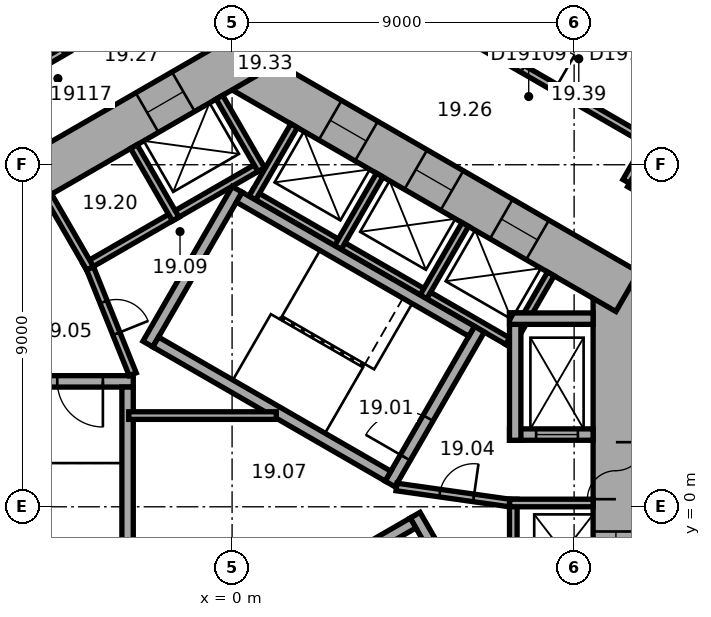
"""IFC4 building model, lengths in metres.
Left out: names, types, materials, properties, quantities, classifications, styles, units other than length and angle.
Written with IfcOpenShell. Run it as: python <this file> out.ifc"""

import sys

from ifc_helpers import new_model, si_unit, direction, frame, frame_2d, origin, place, context, subcontext, project, spatial, rectangle, extrude, element, fill, save


model = new_model("IFC4")
c1 = context("Model", 3, precision=1e-05, world=origin(), true_north=direction((0.0, 1.0)))
c2 = subcontext(c1, "Body", "Model", "MODEL_VIEW")
j1 = project(units=[si_unit("LENGTHUNIT", "METRE"), si_unit("PLANEANGLEUNIT", "RADIAN")], contexts=[c1])
p1 = place(None, origin())
s1 = spatial("IfcSite", under=j1, at=p1, CompositionType="ELEMENT")
p2 = place(p1, origin())
s2 = spatial("IfcBuilding", under=s1, at=p2, CompositionType="ELEMENT")
p3 = place(p2, frame((0.0, 0.0, 86.9)))
s3 = spatial("IfcBuildingStorey", under=s2, at=p3, CompositionType="ELEMENT", Elevation=86.9)
p4 = place(p3, frame((10.1, -6.177, 0.0), z_axis=(0.0, 0.0, 1.0), x_axis=(0.0, 1.0, 0.0)))
e1 = element("IfcWall", 1, at=p4, inside=s3, PredefinedType="SHEAR", context=c2, shape_type="SweptSolid", body=[
    extrude(rectangle(XDim=12.355, YDim=1.2, at=frame_2d((6.177, 0.0))), origin(), (0.0, 0.0, 1.0), 3.3),
])
p5 = place(p4, frame((6.378, 0.0, 0.0)))
e2 = element("IfcOpeningElement", 2, at=p5, cuts=e1, PredefinedType="OPENING", context=c2, shape_type="SweptSolid", body=[
    extrude(rectangle(XDim=1.5, YDim=2.1, at=frame_2d((0.75, 1.05))), frame((0.0, 0.61, 0.0), z_axis=(0.0, -1.0, 0.0), x_axis=(1.0, 0.0, 0.0)), (0.0, 0.0, 1.0), 1.22),
])
p6 = place(p4, frame((1.828, 0.0, 0.0)))
e3 = element("IfcOpeningElement", 3, at=p6, cuts=e1, PredefinedType="OPENING", context=c2, shape_type="SweptSolid", body=[
    extrude(rectangle(XDim=1.1, YDim=2.1, at=frame_2d((0.55, 1.05))), frame((0.0, 0.61, 0.0), z_axis=(0.0, -1.0, 0.0), x_axis=(1.0, 0.0, 0.0)), (0.0, 0.0, 1.0), 1.22),
])
p7 = place(p4, frame((4.427, 0.0, 0.0)))
e4 = element("IfcOpeningElement", 4, at=p7, cuts=e1, PredefinedType="OPENING", context=c2, shape_type="SweptSolid", body=[
    extrude(rectangle(XDim=1.1, YDim=2.1, at=frame_2d((0.55, 1.05))), frame((0.0, 0.61, 0.0), z_axis=(0.0, -1.0, 0.0), x_axis=(1.0, 0.0, 0.0)), (0.0, 0.0, 1.0), 1.22),
])
p8 = place(p3, frame((10.4, 5.658, 0.0), z_axis=(0.0, 0.0, 1.0), x_axis=(-0.866021384402, 0.500006961711, 0.0)))
e5 = element("IfcWall", 5, at=p8, inside=s3, PredefinedType="SHEAR", context=c2, shape_type="SweptSolid", body=[
    extrude(rectangle(XDim=12.355, YDim=1.2, at=frame_2d((6.178, 0.0))), origin(), (0.0, 0.0, 1.0), 3.3),
])
p9 = place(p8, frame((2.728, 0.0, 0.0)))
e6 = element("IfcOpeningElement", 6, at=p9, cuts=e5, PredefinedType="OPENING", context=c2, shape_type="SweptSolid", body=[
    extrude(rectangle(XDim=1.1, YDim=2.1, at=frame_2d((0.55, 1.05))), frame((0.0, 0.61, 0.0), z_axis=(0.0, -1.0, 0.0), x_axis=(1.0, 0.0, 0.0)), (0.0, 0.0, 1.0), 1.22),
])
p10 = place(p8, frame((5.328, 0.0, 0.0)))
e7 = element("IfcOpeningElement", 7, at=p10, cuts=e5, PredefinedType="OPENING", context=c2, shape_type="SweptSolid", body=[
    extrude(rectangle(XDim=1.1, YDim=2.1, at=frame_2d((0.55, 1.05))), frame((0.0, 0.61, 0.0), z_axis=(0.0, -1.0, 0.0), x_axis=(1.0, 0.0, 0.0)), (0.0, 0.0, 1.0), 1.22),
])
p11 = place(p8, frame((7.928, 0.0, 0.0)))
e8 = element("IfcOpeningElement", 8, at=p11, cuts=e5, PredefinedType="OPENING", context=c2, shape_type="SweptSolid", body=[
    extrude(rectangle(XDim=1.1, YDim=2.1, at=frame_2d((0.55, 1.05))), frame((0.0, 0.61, 0.0), z_axis=(0.0, -1.0, 0.0), x_axis=(1.0, 0.0, 0.0)), (0.0, 0.0, 1.0), 1.22),
])
p12 = place(p3, frame((0.3, 11.836, 0.0), z_axis=(0.0, 0.0, 1.0), x_axis=(-0.866021384402, -0.500006961711, 0.0)))
e9 = element("IfcWall", 9, at=p12, inside=s3, PredefinedType="SHEAR", context=c2, shape_type="SweptSolid", body=[
    extrude(rectangle(XDim=12.355, YDim=1.2, at=frame_2d((6.178, 0.0))), origin(), (0.0, 0.0, 1.0), 3.3),
])
p13 = place(p12, frame((6.378, 0.0, 0.0)))
e10 = element("IfcOpeningElement", 10, at=p13, cuts=e9, PredefinedType="OPENING", context=c2, shape_type="SweptSolid", body=[
    extrude(rectangle(XDim=1.5, YDim=2.1, at=frame_2d((0.75, 1.05))), frame((0.0, 0.61, 0.0), z_axis=(0.0, -1.0, 0.0), x_axis=(1.0, 0.0, 0.0)), (0.0, 0.0, 1.0), 1.22),
])
p14 = place(p12, frame((1.828, 0.0, 0.0)))
e11 = element("IfcOpeningElement", 11, at=p14, cuts=e9, PredefinedType="OPENING", context=c2, shape_type="SweptSolid", body=[
    extrude(rectangle(XDim=1.1, YDim=2.1, at=frame_2d((0.55, 1.05))), frame((0.0, 0.61, 0.0), z_axis=(0.0, -1.0, 0.0), x_axis=(1.0, 0.0, 0.0)), (0.0, 0.0, 1.0), 1.22),
])
p15 = place(p3, frame((7.4, -5.2, 0.0), z_axis=(0.0, 0.0, 1.0), x_axis=(0.0, 1.0, 0.0)))
e12 = element("IfcWall", 12, at=p15, inside=s3, PredefinedType="PARTITIONING", context=c2, shape_type="SweptSolid", body=[
    extrude(rectangle(XDim=5.4, YDim=0.2, at=frame_2d((2.7, 0.0))), origin(), (0.0, 0.0, 1.0), 3.05),
])
p16 = place(p3, frame((7.3, 0.1, 0.0), z_axis=(0.0, 0.0, 1.0), x_axis=(1.0, 0.0, 0.0)))
e13 = element("IfcWall", 13, at=p16, inside=s3, PredefinedType="PARTITIONING", context=c2, shape_type="SweptSolid", body=[
    extrude(rectangle(XDim=2.2, YDim=0.2, at=frame_2d((1.1, 0.0))), origin(), (0.0, 0.0, 1.0), 3.05),
])
p17 = place(p3, frame((7.424, 4.259, 0.0), z_axis=(0.0, 0.0, 1.0), x_axis=(-0.866026010844, 0.49999894854, 0.0)))
e14 = element("IfcWall", 14, at=p17, inside=s3, PredefinedType="PARTITIONING", context=c2, shape_type="SweptSolid", body=[
    extrude(rectangle(XDim=8.0, YDim=0.2, at=frame_2d((4.0, 0.0))), origin(), (0.0, 0.0, 1.0), 3.05),
])
for number, where, z_axis, x_axis in (
    (15, (7.287, 4.222, 0.0), (0.0, 0.0, 1.0), (0.5, 0.866, 0.0)),
    (16, (5.036, 5.522, 0.0), (0.0, 0.0, 1.0), (0.5, 0.866, 0.0)),
    (17, (2.784, 6.822, 0.0), (0.0, 0.0, 1.0), (0.5, 0.866, 0.0)),
    (18, (0.532, 8.122, 0.0), (0.0, 0.0, 1.0), (0.5, 0.866, 0.0)),
):
    element("IfcWall", number, at=place(p3, frame(where, z_axis=z_axis, x_axis=x_axis)), inside=s3, PredefinedType="PARTITIONING", context=c2, shape_type="SweptSolid", body=[
        extrude(rectangle(XDim=2.2, YDim=0.2, at=frame_2d((1.1, 0.0))), origin(), (0.0, 0.0, 1.0), 3.05),
    ])
p18 = place(p3, frame((0.803, 9.009, 0.0), z_axis=(0.0, 0.0, 1.0), x_axis=(-0.866028230842, -0.499995103361, 0.0)))
e19 = element("IfcWall", 19, at=p18, inside=s3, PredefinedType="PARTITIONING", context=c2, shape_type="SweptSolid", body=[
    extrude(rectangle(XDim=5.4, YDim=0.2, at=frame_2d((2.7, 0.0))), origin(), (0.0, 0.0, 1.0), 3.05),
])
p19 = place(p3, frame((0.767, 8.872, 0.0), z_axis=(0.0, 0.0, 1.0), x_axis=(-0.499994660107, 0.866028486751, 0.0)))
e20 = element("IfcWall", 20, at=p19, inside=s3, PredefinedType="PARTITIONING", context=c2, shape_type="SweptSolid", body=[
    extrude(rectangle(XDim=2.2, YDim=0.2, at=frame_2d((1.1, 0.0))), origin(), (0.0, 0.0, 1.0), 3.05),
])
for number, where, z_axis, x_axis in (
    (21, (-1.485, 7.572, 0.0), (0.0, 0.0, 1.0), (-0.5, 0.866, 0.0)),
    (22, (-3.737, 6.272, 0.0), (0.0, 0.0, 1.0), (-0.5, 0.866, 0.0)),
):
    element("IfcWall", number, at=place(p3, frame(where, z_axis=z_axis, x_axis=x_axis)), inside=s3, PredefinedType="PARTITIONING", context=c2, shape_type="SweptSolid", body=[
        extrude(rectangle(XDim=2.2, YDim=0.2, at=frame_2d((1.1, 0.0))), origin(), (0.0, 0.0, 1.0), 3.05),
    ])
p20 = place(p3, frame((4.158, 0.602, 0.0), z_axis=(0.0, 0.0, 1.0), x_axis=(0.499977259774, 0.866038532462, 0.0)))
e23 = element("IfcWall", 23, at=p20, inside=s3, PredefinedType="SHEAR", context=c2, shape_type="SweptSolid", body=[
    extrude(rectangle(XDim=4.7, YDim=0.3, at=frame_2d((2.35, 0.0))), origin(), (0.0, 0.0, 1.0), 3.05),
])
p21 = place(p20, frame((0.8, 0.0, 0.0)))
e24 = element("IfcOpeningElement", 24, at=p21, cuts=e23, PredefinedType="OPENING", context=c2, shape_type="SweptSolid", body=[
    extrude(rectangle(XDim=1.2, YDim=2.1, at=frame_2d((0.6, 1.05))), frame((0.0, 0.16, 0.0), z_axis=(0.0, -1.0, 0.0), x_axis=(1.0, 0.0, 0.0)), (0.0, 0.0, 1.0), 0.32),
])
p22 = place(p3, frame((-2.216, 4.282, 0.0), z_axis=(0.0, 0.0, 1.0), x_axis=(0.499977259774, 0.866038532462, 0.0)))
e25 = element("IfcWall", 25, at=p22, inside=s3, PredefinedType="SHEAR", context=c2, shape_type="SweptSolid", body=[
    extrude(rectangle(XDim=4.7, YDim=0.3, at=frame_2d((2.35, 0.0))), origin(), (0.0, 0.0, 1.0), 3.05),
])
for number, where, z_axis, x_axis in (
    (26, (4.103, 0.807, 0.0), (0.0, 0.0, 1.0), (-0.866, 0.5, 0.0)),
    (27, (6.303, 4.617, 0.0), (0.0, 0.0, 1.0), (-0.866, 0.5, 0.0)),
):
    element("IfcWall", number, at=place(p3, frame(where, z_axis=z_axis, x_axis=x_axis)), inside=s3, PredefinedType="SHEAR", context=c2, shape_type="SweptSolid", body=[
        extrude(rectangle(XDim=7.06, YDim=0.3, at=frame_2d((3.53, 0.0))), origin(), (0.0, 0.0, 1.0), 3.05),
    ])
p23 = place(p3, frame((-2.6, 3.3, 0.0), z_axis=(0.0, 0.0, 1.0), x_axis=(-1.0, 0.0, 0.0)))
e28 = element("IfcWall", 28, at=p23, inside=s3, PredefinedType="SHEAR", context=c2, shape_type="SweptSolid", body=[
    extrude(rectangle(XDim=4.7, YDim=0.3, at=frame_2d((2.35, 0.0))), origin(), (0.0, 0.0, 1.0), 3.05),
])
p24 = place(p23, frame((0.8, 0.0, 0.0)))
e29 = element("IfcOpeningElement", 29, at=p24, cuts=e28, PredefinedType="OPENING", context=c2, shape_type="SweptSolid", body=[
    extrude(rectangle(XDim=1.2, YDim=2.1, at=frame_2d((0.6, 1.05))), frame((0.0, 0.16, 0.0), z_axis=(0.0, -1.0, 0.0), x_axis=(1.0, 0.0, 0.0)), (0.0, 0.0, 1.0), 0.32),
])
p25 = place(p3, frame((-2.75, 3.15, 0.0), z_axis=(0.0, 0.0, 1.0), x_axis=(0.0, -1.0, 0.0)))
e30 = element("IfcWall", 30, at=p25, inside=s3, PredefinedType="SHEAR", context=c2, shape_type="SweptSolid", body=[
    extrude(rectangle(XDim=7.06, YDim=0.3, at=frame_2d((3.53, 0.0))), origin(), (0.0, 0.0, 1.0), 3.05),
])
p26 = place(p3, frame((4.816, -0.222, 0.0), z_axis=(0.0, 0.0, 1.0), x_axis=(0.499977259774, -0.866038532462, 0.0)))
e31 = element("IfcWall", 31, at=p26, inside=s3, PredefinedType="SHEAR", context=c2, shape_type="SweptSolid", body=[
    extrude(rectangle(XDim=4.7, YDim=0.3, at=frame_2d((2.35, 0.0))), origin(), (0.0, 0.0, 1.0), 3.05),
])
p27 = place(p3, frame((-1.353, -3.957, 0.0), z_axis=(0.0, 0.0, 1.0), x_axis=(0.866027801685, 0.499995846692, 0.0)))
e32 = element("IfcWall", 32, at=p27, inside=s3, PredefinedType="SHEAR", context=c2, shape_type="SweptSolid", body=[
    extrude(rectangle(XDim=7.06, YDim=0.3, at=frame_2d((3.53, 0.0))), origin(), (0.0, 0.0, 1.0), 3.05),
])
p28 = place(p3, frame((7.3, 1.9, 0.0), z_axis=(0.0, 0.0, 1.0), x_axis=(1.0, 0.0, 0.0)))
e33 = element("IfcWall", 33, at=p28, inside=s3, PredefinedType="SHEAR", context=c2, shape_type="SweptSolid", body=[
    extrude(rectangle(XDim=2.2, YDim=0.3, at=frame_2d((1.1, 0.0))), origin(), (0.0, 0.0, 1.0), 3.05),
])
p29 = place(p28, frame((0.7, 0.0, 0.0)))
e34 = element("IfcOpeningElement", 34, at=p29, cuts=e33, PredefinedType="OPENING", context=c2, shape_type="SweptSolid", body=[
    extrude(rectangle(XDim=1.1, YDim=2.1, at=frame_2d((0.55, 1.05))), frame((0.0, 0.16, 0.0), z_axis=(0.0, -1.0, 0.0), x_axis=(1.0, 0.0, 0.0)), (0.0, 0.0, 1.0), 0.32),
])
p30 = place(p3, frame((7.45, 1.75, 0.0), z_axis=(0.0, 0.0, 1.0), x_axis=(0.0, 1.0, 0.0)))
e35 = element("IfcWall", 35, at=p30, inside=s3, PredefinedType="SHEAR", context=c2, shape_type="SweptSolid", body=[
    extrude(rectangle(XDim=3.35, YDim=0.3, at=frame_2d((1.675, 0.0))), origin(), (0.0, 0.0, 1.0), 3.05),
])
p31 = place(p3, frame((7.3, 4.95, 0.0), z_axis=(0.0, 0.0, 1.0), x_axis=(1.0, 0.0, 0.0)))
e36 = element("IfcWall", 36, at=p31, inside=s3, PredefinedType="SHEAR", context=c2, shape_type="SweptSolid", body=[
    extrude(rectangle(XDim=2.2, YDim=0.3, at=frame_2d((1.1, 0.0))), origin(), (0.0, 0.0, 1.0), 3.05),
])
p32 = place(p3, frame((4.327, 0.521, 0.0), z_axis=(0.0, 0.0, 1.0), x_axis=(0.990124376366, -0.14019172346, 0.0)))
e37 = element("IfcWall", 37, at=p32, inside=s3, PredefinedType="PARTITIONING", context=c2, shape_type="SweptSolid", body=[
    extrude(rectangle(XDim=3.002, YDim=0.2, at=frame_2d((1.501, 0.0))), origin(), (0.0, 0.0, 1.0), 3.05),
])
p33 = place(p32, frame((1.15, 0.0, 0.0)))
e38 = element("IfcOpeningElement", 38, at=p33, cuts=e37, PredefinedType="OPENING", context=c2, shape_type="SweptSolid", body=[
    extrude(rectangle(XDim=0.9, YDim=2.1, at=frame_2d((0.45, 1.05))), frame((0.0, 0.11, 0.0), z_axis=(0.0, -1.0, 0.0), x_axis=(1.0, 0.0, 0.0)), (0.0, 0.0, 1.0), 0.22),
])
p34 = place(p3, frame((-2.615, 3.487, 0.0), z_axis=(0.0, 0.0, 1.0), x_axis=(-0.373576831041, 0.92759924068, 0.0)))
e39 = element("IfcWall", 39, at=p34, inside=s3, PredefinedType="PARTITIONING", context=c2, shape_type="SweptSolid", body=[
    extrude(rectangle(XDim=3.002, YDim=0.2, at=frame_2d((1.501, 0.0))), origin(), (0.0, 0.0, 1.0), 3.05),
])
p35 = place(p34, frame((1.15, 0.0, 0.0)))
e40 = element("IfcOpeningElement", 40, at=p35, cuts=e39, PredefinedType="OPENING", context=c2, shape_type="SweptSolid", body=[
    extrude(rectangle(XDim=0.9, YDim=2.1, at=frame_2d((0.45, 1.05))), frame((0.0, 0.11, 0.0), z_axis=(0.0, -1.0, 0.0), x_axis=(1.0, 0.0, 0.0)), (0.0, 0.0, 1.0), 0.22),
])
p36 = place(p3, frame((-2.72, 2.4, 0.0), z_axis=(0.0, 0.0, 1.0), x_axis=(1.0, 0.0, 0.0)))
e41 = element("IfcWall", 41, at=p36, inside=s3, PredefinedType="PARTITIONING", context=c2, shape_type="SweptSolid", body=[
    extrude(rectangle(XDim=3.883, YDim=0.2, at=frame_2d((1.941, 0.0))), origin(), (0.0, 0.0, 1.0), 3.05),
])
p37 = place(p3, frame((-4.309, 12.061, 0.0), z_axis=(0.0, 0.0, 1.0), x_axis=(-0.866020679205, -0.500008183122, 0.0)))
e42 = element("IfcWall", 42, at=p37, inside=s3, PredefinedType="PARTITIONING", context=c2, shape_type="SweptSolid", body=[
    extrude(rectangle(XDim=5.104, YDim=0.2, at=frame_2d((2.552, 0.0))), origin(), (0.0, 0.0, 1.0), 3.05),
])
p38 = place(p37, frame((0.185, 0.0, 0.0)))
e43 = element("IfcOpeningElement", 43, at=p38, cuts=e42, PredefinedType="OPENING", context=c2, shape_type="SweptSolid", body=[
    extrude(rectangle(XDim=0.9, YDim=2.1, at=frame_2d((0.45, 1.05))), frame((0.0, 0.11, 0.0), z_axis=(0.0, -1.0, 0.0), x_axis=(1.0, 0.0, 0.0)), (0.0, 0.0, 1.0), 0.22),
])
p39 = place(p37, frame((3.761, 0.0, 0.0)))
e44 = element("IfcOpeningElement", 44, at=p39, cuts=e42, PredefinedType="OPENING", context=c2, shape_type="SweptSolid", body=[
    extrude(rectangle(XDim=0.9, YDim=2.1, at=frame_2d((0.45, 1.05))), frame((0.0, 0.11, 0.0), z_axis=(0.0, -1.0, 0.0), x_axis=(1.0, 0.0, 0.0)), (0.0, 0.0, 1.0), 0.22),
])
p40 = place(p3, frame((10.371, 8.561, 0.0), z_axis=(0.0, 0.0, 1.0), x_axis=(0.499986357472, 0.866033280158, 0.0)))
e45 = element("IfcWall", 45, at=p40, inside=s3, PredefinedType="PARTITIONING", context=c2, shape_type="SweptSolid", body=[
    extrude(rectangle(XDim=1.201, YDim=0.2, at=frame_2d((0.601, 0.0))), origin(), (0.0, 0.0, 1.0), 3.05),
])
p41 = place(p3, frame((10.885, 9.652, 0.0), z_axis=(0.0, 0.0, 1.0), x_axis=(-0.866033868542, 0.499985338323, 0.0)))
e46 = element("IfcWall", 46, at=p41, inside=s3, PredefinedType="PARTITIONING", context=c2, shape_type="SweptSolid", body=[
    extrude(rectangle(XDim=8.602, YDim=0.2, at=frame_2d((4.301, 0.0))), origin(), (0.0, 0.0, 1.0), 3.05),
])
p42 = place(p41, frame((2.739, 0.0, 0.0)))
e47 = element("IfcOpeningElement", 47, at=p42, cuts=e46, PredefinedType="OPENING", context=c2, shape_type="SweptSolid", body=[
    extrude(rectangle(XDim=1.0, YDim=2.1, at=frame_2d((0.5, 1.05))), frame((0.0, 0.11, 0.0), z_axis=(0.0, -1.0, 0.0), x_axis=(1.0, 0.0, 0.0)), (0.0, 0.0, 1.0), 0.22),
])
p43 = place(p3, frame((11.566, 7.871, 0.0), z_axis=(0.0, 0.0, 1.0), x_axis=(-0.866004557827, 0.500036104519, 0.0)))
e48 = element("IfcWall", 48, at=p43, inside=s3, PredefinedType="PARTITIONING", context=c2, shape_type="SweptSolid", body=[
    extrude(rectangle(XDim=1.28, YDim=0.2, at=frame_2d((0.64, 0.0))), origin(), (0.0, 0.0, 1.0), 3.05),
])
p44 = place(p3, frame((12.866, 10.702, 0.0), z_axis=(0.0, 0.0, 1.0), x_axis=(-0.866023151433, 0.500003901167, 0.0)))
e49 = element("IfcWall", 49, at=p44, inside=s3, PredefinedType="PARTITIONING", context=c2, shape_type="SweptSolid", body=[
    extrude(rectangle(XDim=7.684, YDim=0.12, at=frame_2d((3.842, 0.0))), origin(), (0.0, 0.0, 1.0), 3.05),
])
p45 = place(p44, frame((0.55, 0.0, 0.0)))
e50 = element("IfcOpeningElement", 50, at=p45, cuts=e49, PredefinedType="OPENING", context=c2, shape_type="SweptSolid", body=[
    extrude(rectangle(XDim=1.0, YDim=2.1, at=frame_2d((0.5, 1.05))), frame((0.0, 0.07, 0.0), z_axis=(0.0, -1.0, 0.0), x_axis=(1.0, 0.0, 0.0)), (0.0, 0.0, 1.0), 0.14),
])
p46 = place(p44, frame((2.8, 0.0, 0.0)))
e51 = element("IfcOpeningElement", 51, at=p46, cuts=e49, PredefinedType="OPENING", context=c2, shape_type="SweptSolid", body=[
    extrude(rectangle(XDim=0.9, YDim=2.1, at=frame_2d((0.45, 1.05))), frame((0.0, 0.07, 0.0), z_axis=(0.0, -1.0, 0.0), x_axis=(1.0, 0.0, 0.0)), (0.0, 0.0, 1.0), 0.14),
])
p47 = place(p44, frame((5.592, 0.0, 0.0)))
e52 = element("IfcOpeningElement", 52, at=p47, cuts=e49, PredefinedType="OPENING", context=c2, shape_type="SweptSolid", body=[
    extrude(rectangle(XDim=0.9, YDim=2.1, at=frame_2d((0.45, 1.05))), frame((0.0, 0.07, 0.0), z_axis=(0.0, -1.0, 0.0), x_axis=(1.0, 0.0, 0.0)), (0.0, 0.0, 1.0), 0.14),
])
p48 = place(p5, origin())
e53 = element("IfcDoor", 53, at=p48, inside=s3, OperationType="DOUBLE_DOOR_SINGLE_SWING", PredefinedType="DOOR", context=c2, shape_type="SweptSolid", body=[
    extrude(rectangle(XDim=1.5, YDim=2.1, at=frame_2d((0.75, 1.05))), frame((0.0, 0.025, 0.0), z_axis=(0.0, -1.0, 0.0), x_axis=(1.0, 0.0, 0.0)), (0.0, 0.0, 1.0), 0.05),
])
fill(e2, e53)
p49 = place(p21, origin())
e54 = element("IfcDoor", 54, at=p49, inside=s3, OperationType="SINGLE_SWING_RIGHT", PredefinedType="DOOR", context=c2, shape_type="SweptSolid", body=[
    extrude(rectangle(XDim=1.2, YDim=2.1, at=frame_2d((0.6, 1.05))), frame((0.0, 0.025, 0.0), z_axis=(0.0, -1.0, 0.0), x_axis=(1.0, 0.0, 0.0)), (0.0, 0.0, 1.0), 0.05),
])
fill(e24, e54)
p50 = place(p24, origin())
e55 = element("IfcDoor", 55, at=p50, inside=s3, OperationType="SINGLE_SWING_RIGHT", PredefinedType="DOOR", context=c2, shape_type="SweptSolid", body=[
    extrude(rectangle(XDim=1.2, YDim=2.1, at=frame_2d((0.6, 1.05))), frame((0.0, 0.025, 0.0), z_axis=(0.0, -1.0, 0.0), x_axis=(1.0, 0.0, 0.0)), (0.0, 0.0, 1.0), 0.05),
])
fill(e29, e55)
p51 = place(p33, origin())
e56 = element("IfcDoor", 56, at=p51, inside=s3, OperationType="SINGLE_SWING_LEFT", PredefinedType="DOOR", context=c2, shape_type="SweptSolid", body=[
    extrude(rectangle(XDim=0.9, YDim=2.1, at=frame_2d((0.45, 1.05))), frame((0.0, 0.025, 0.0), z_axis=(0.0, -1.0, 0.0), x_axis=(1.0, 0.0, 0.0)), (0.0, 0.0, 1.0), 0.05),
])
fill(e38, e56)
p52 = place(p35, origin())
e57 = element("IfcDoor", 57, at=p52, inside=s3, OperationType="SINGLE_SWING_LEFT", PredefinedType="DOOR", context=c2, shape_type="SweptSolid", body=[
    extrude(rectangle(XDim=0.9, YDim=2.1, at=frame_2d((0.45, 1.05))), frame((0.0, 0.025, 0.0), z_axis=(0.0, -1.0, 0.0), x_axis=(1.0, 0.0, 0.0)), (0.0, 0.0, 1.0), 0.05),
])
fill(e40, e57)
p53 = place(p29, origin())
e58 = element("IfcDoor", 58, at=p53, inside=s3, OperationType="DOUBLE_DOOR_SLIDING", PredefinedType="DOOR", context=c2, shape_type="SweptSolid", body=[
    extrude(rectangle(XDim=1.1, YDim=2.1, at=frame_2d((0.55, 1.05))), frame((0.0, 0.025, 0.0), z_axis=(0.0, -1.0, 0.0), x_axis=(1.0, 0.0, 0.0)), (0.0, 0.0, 1.0), 0.05),
])
fill(e34, e58)
p54 = place(p7, origin())
e59 = element("IfcDoor", 59, at=p54, inside=s3, OperationType="DOUBLE_DOOR_SLIDING", PredefinedType="DOOR", context=c2, shape_type="SweptSolid", body=[
    extrude(rectangle(XDim=1.1, YDim=2.1, at=frame_2d((0.55, 1.05))), frame((0.0, 0.025, 0.0), z_axis=(0.0, -1.0, 0.0), x_axis=(1.0, 0.0, 0.0)), (0.0, 0.0, 1.0), 0.05),
])
fill(e4, e59)
p55 = place(p9, origin())
e60 = element("IfcDoor", 60, at=p55, inside=s3, OperationType="DOUBLE_DOOR_SLIDING", PredefinedType="DOOR", context=c2, shape_type="SweptSolid", body=[
    extrude(rectangle(XDim=1.1, YDim=2.1, at=frame_2d((0.55, 1.05))), frame((0.0, 0.025, 0.0), z_axis=(0.0, -1.0, 0.0), x_axis=(1.0, 0.0, 0.0)), (0.0, 0.0, 1.0), 0.05),
])
fill(e6, e60)
p56 = place(p10, origin())
e61 = element("IfcDoor", 61, at=p56, inside=s3, OperationType="DOUBLE_DOOR_SLIDING", PredefinedType="DOOR", context=c2, shape_type="SweptSolid", body=[
    extrude(rectangle(XDim=1.1, YDim=2.1, at=frame_2d((0.55, 1.05))), frame((0.0, 0.025, 0.0), z_axis=(0.0, -1.0, 0.0), x_axis=(1.0, 0.0, 0.0)), (0.0, 0.0, 1.0), 0.05),
])
fill(e7, e61)
p57 = place(p11, origin())
e62 = element("IfcDoor", 62, at=p57, inside=s3, OperationType="DOUBLE_DOOR_SLIDING", PredefinedType="DOOR", context=c2, shape_type="SweptSolid", body=[
    extrude(rectangle(XDim=1.1, YDim=2.1, at=frame_2d((0.55, 1.05))), frame((0.0, 0.025, 0.0), z_axis=(0.0, -1.0, 0.0), x_axis=(1.0, 0.0, 0.0)), (0.0, 0.0, 1.0), 0.05),
])
fill(e8, e62)
p58 = place(p14, origin())
e63 = element("IfcDoor", 63, at=p58, inside=s3, OperationType="DOUBLE_DOOR_SLIDING", PredefinedType="DOOR", context=c2, shape_type="SweptSolid", body=[
    extrude(rectangle(XDim=1.1, YDim=2.1, at=frame_2d((0.55, 1.05))), frame((0.0, 0.025, 0.0), z_axis=(0.0, -1.0, 0.0), x_axis=(1.0, 0.0, 0.0)), (0.0, 0.0, 1.0), 0.05),
])
fill(e11, e63)
p59 = place(p42, origin())
e64 = element("IfcDoor", 64, at=p59, inside=s3, OperationType="SINGLE_SWING_LEFT", PredefinedType="DOOR", context=c2, shape_type="SweptSolid", body=[
    extrude(rectangle(XDim=1.0, YDim=2.1, at=frame_2d((0.5, 1.05))), frame((0.0, 0.025, 0.0), z_axis=(0.0, -1.0, 0.0), x_axis=(1.0, 0.0, 0.0)), (0.0, 0.0, 1.0), 0.05),
])
fill(e47, e64)
p60 = place(p38, origin())
e65 = element("IfcDoor", 65, at=p60, inside=s3, OperationType="SINGLE_SWING_LEFT", PredefinedType="DOOR", context=c2, shape_type="SweptSolid", body=[
    extrude(rectangle(XDim=0.9, YDim=2.1, at=frame_2d((0.45, 1.05))), frame((0.0, 0.025, 0.0), z_axis=(0.0, -1.0, 0.0), x_axis=(1.0, 0.0, 0.0)), (0.0, 0.0, 1.0), 0.05),
])
fill(e43, e65)
save(model, sys.argv[1])
